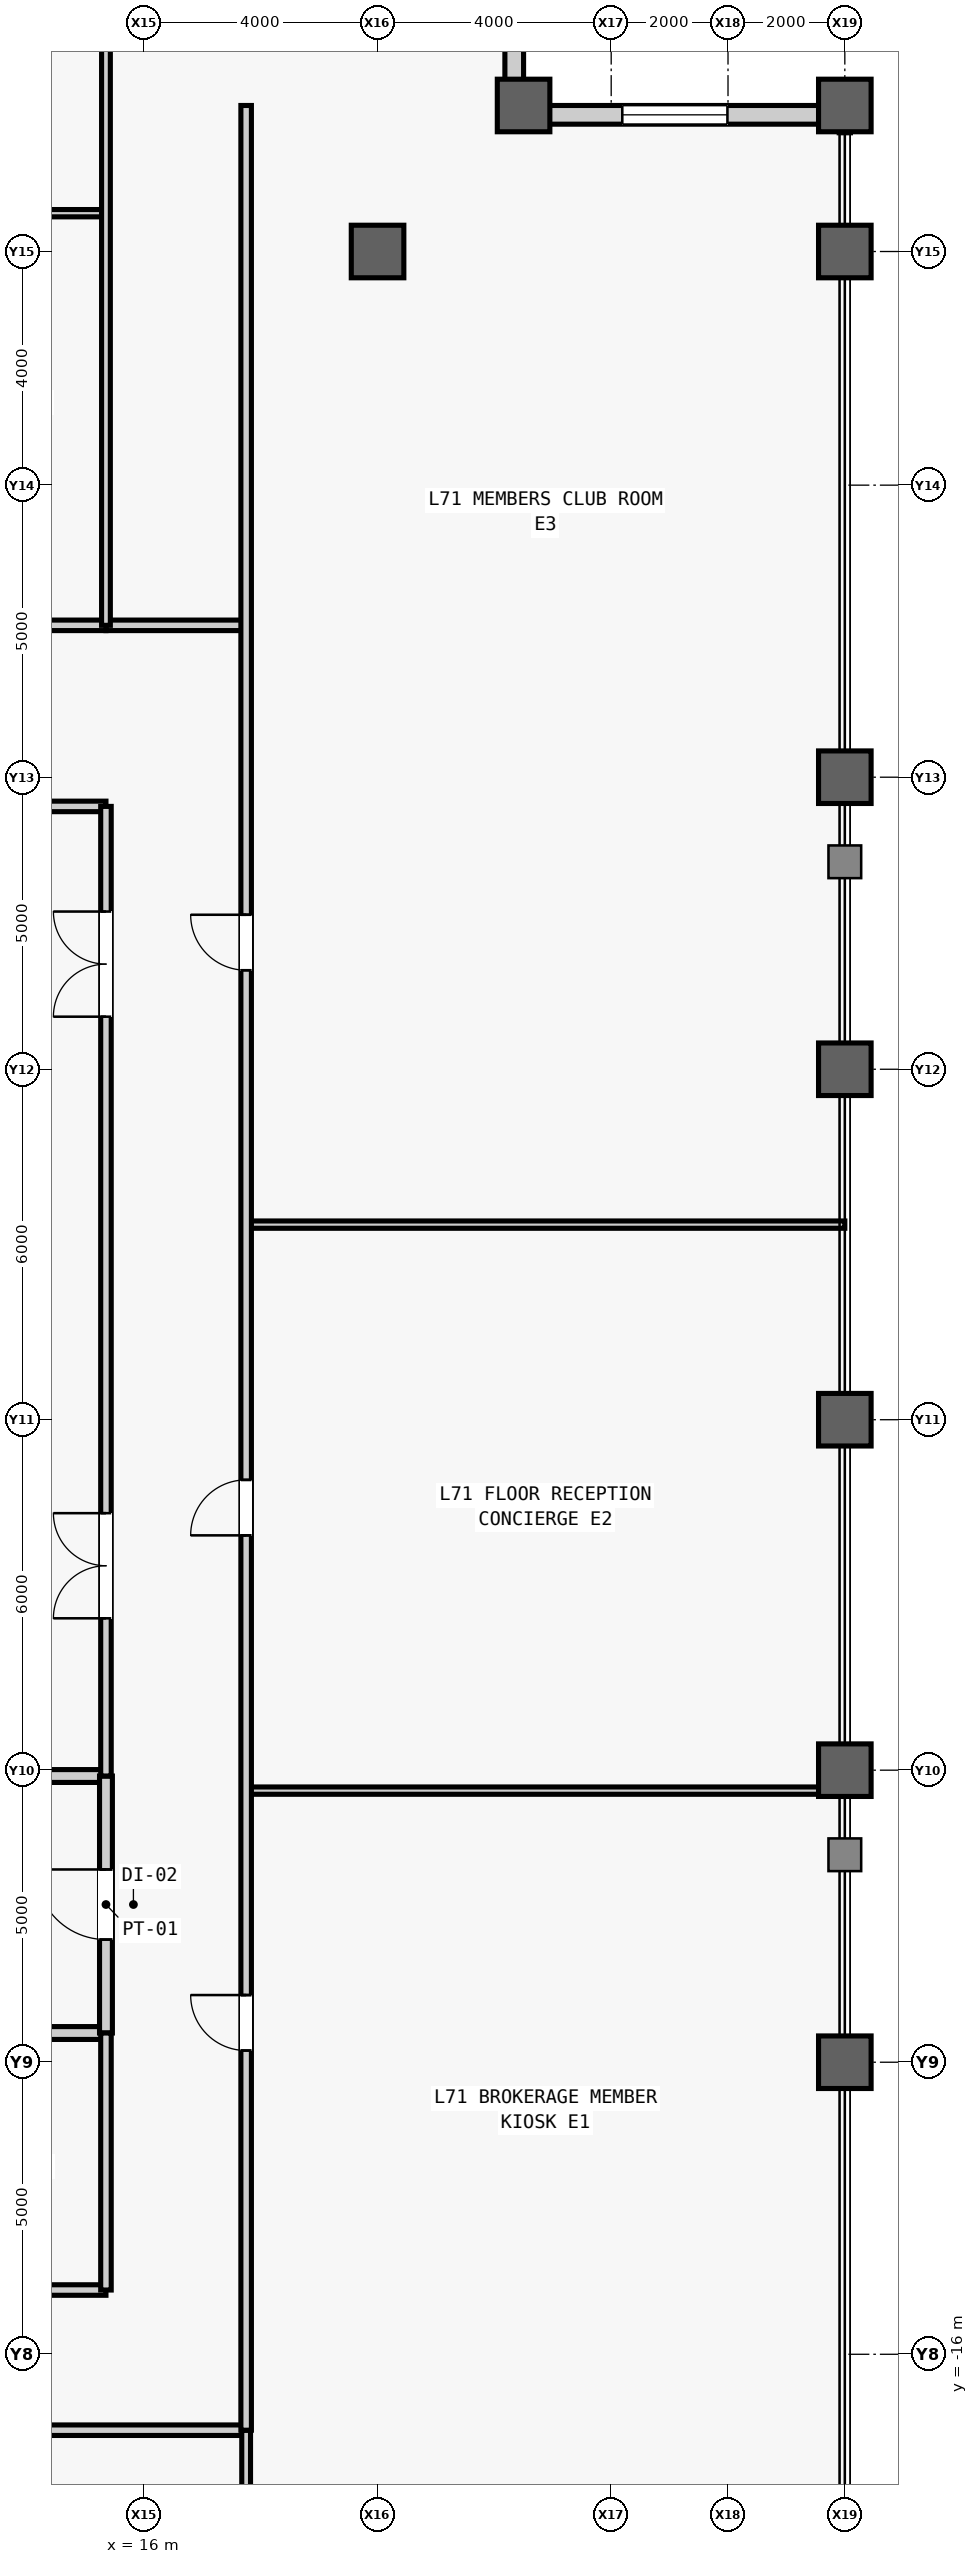
"""IFC4 building model, lengths in metres.
Left out: names, types, materials, properties, quantities, classifications, styles, units other than length and angle.
Written with IfcOpenShell. Run it as: python <this file> out.ifc"""

import sys

from ifc_helpers import new_model, si_unit, direction, frame, frame_2d, origin, origin_2d, place, context, subcontext, project, spatial, rectangle, hollow_rectangle, extrude, source, transform, mapped, element, fill, save


model = new_model("IFC4")
c1 = context("Model", 3, precision=1e-05, world=origin(), true_north=direction((0.0, 1.0)))
c2 = subcontext(c1, "Body", "Model", "MODEL_VIEW")
j1 = project(units=[si_unit("LENGTHUNIT", "METRE"), si_unit("PLANEANGLEUNIT", "RADIAN")], contexts=[c1])
p1 = place(None, origin())
s1 = spatial("IfcSite", under=j1, at=p1, CompositionType="ELEMENT")
p2 = place(p1, origin())
s2 = spatial("IfcBuilding", under=s1, at=p2, CompositionType="ELEMENT")
p3 = place(p2, frame((0.0, 0.0, 301.5)))
s3 = spatial("IfcBuildingStorey", under=s2, at=p3, CompositionType="ELEMENT", Elevation=301.5)
m1 = source(origin(), c2, "Body", "SweptSolid", [
    extrude(hollow_rectangle(XDim=0.9, YDim=0.9, WallThickness=0.05, at=origin_2d()), origin(), (0.0, 0.0, 1.0), 4.0),
])
for number, where, z_axis, x_axis in (
    (1, (20.0, 20.0, 0.0), (0.0, 0.0, 1.0), (1.0, 0.0, 0.0)),
    (2, (22.5, 22.5, 0.0), (0.0, 0.0, 1.0), (1.0, 0.0, 0.0)),
    (3, (28.0, -11.0, 0.0), (0.0, 0.0, 1.0), (1.0, 0.0, 0.0)),
    (4, (28.0, -6.0, 0.0), (0.0, 0.0, 1.0), (1.0, 0.0, 0.0)),
    (5, (28.0, 0.0, 0.0), (0.0, 0.0, 1.0), (1.0, 0.0, 0.0)),
    (6, (28.0, 6.0, 0.0), (0.0, 0.0, 1.0), (1.0, 0.0, 0.0)),
    (7, (28.0, 11.0, 0.0), (0.0, 0.0, 1.0), (1.0, 0.0, 0.0)),
    (8, (28.0, 20.0, 0.0), (0.0, 0.0, 1.0), (1.0, 0.0, 0.0)),
    (9, (28.0, 22.5, 0.0), (0.0, 0.0, 1.0), (1.0, 0.0, 0.0)),
):
    element("IfcColumn", number, at=place(p3, frame(where, z_axis=z_axis, x_axis=x_axis)), inside=s3, PredefinedType="COLUMN", context=c2, shape_type="MappedRepresentation", body=[
        mapped(m1, transform((0.0, 0.0, 0.0), scale=1.0)),
    ])
m2 = source(origin(), c2, "Body", "SweptSolid", [
    extrude(rectangle(XDim=5.18, YDim=0.32, at=frame_2d((2.59, 0.0))), origin(), (0.0, 0.0, 1.0), 3.231),
])
p4 = place(p3, frame((22.5, 22.34, 0.0), z_axis=(0.0, 0.0, 1.0), x_axis=(1.0, 0.0, 0.0)))
e10 = element("IfcWall", 10, at=p4, inside=s3, PredefinedType="STANDARD", context=c2, shape_type="MappedRepresentation", body=[
    mapped(m2, transform((0.0, 0.0, 0.0), scale=1.0)),
])
m3 = source(origin(), c2, "Body", "SweptSolid", [
    extrude(rectangle(XDim=1.8, YDim=2.4, at=frame_2d((0.9, 1.2))), frame((0.0, 0.17, 0.0), z_axis=(0.0, -1.0, 0.0), x_axis=(1.0, 0.0, 0.0)), (0.0, 0.0, 1.0), 0.34),
])
p5 = place(p4, frame((1.69, 0.0, 0.5)))
e11 = element("IfcOpeningElement", 11, at=p5, cuts=e10, PredefinedType="OPENING", context=c2, shape_type="MappedRepresentation", body=[
    mapped(m3, transform((0.0, 0.0, 0.0), scale=1.0)),
])
p6 = place(p3, frame((22.34, 22.5, 0.0), z_axis=(0.0, 0.0, 1.0), x_axis=(0.0, 1.0, 0.0)))
e12 = element("IfcWall", 12, at=p6, inside=s3, PredefinedType="STANDARD", context=c2, shape_type="MappedRepresentation", body=[
    mapped(m2, transform((0.0, 0.0, 0.0), scale=1.0)),
])
p7 = place(p6, frame((1.69, 0.0, 0.5)))
e13 = element("IfcOpeningElement", 13, at=p7, cuts=e12, PredefinedType="OPENING", context=c2, shape_type="MappedRepresentation", body=[
    mapped(m3, transform((0.0, 0.0, 0.0), scale=1.0)),
])
m4 = source(origin(), c2, "Body", "SweptSolid", [
    extrude(rectangle(XDim=4.05, YDim=0.22, at=frame_2d((2.025, 0.0))), origin(), (0.0, 0.0, 1.0), 3.78),
])
p8 = place(p3, frame((11.3, -10.5, 0.0), z_axis=(0.0, 0.0, 1.0), x_axis=(1.0, 0.0, 0.0)))
e14 = element("IfcWall", 14, at=p8, inside=s3, PredefinedType="PARTITIONING", context=c2, shape_type="MappedRepresentation", body=[
    mapped(m4, transform((0.0, 0.0, 0.0), scale=1.0)),
])
m5 = source(origin(), c2, "Body", "SweptSolid", [
    extrude(rectangle(XDim=4.05, YDim=0.22, at=frame_2d((2.025, 0.0))), origin(), (0.0, 0.0, 1.0), 3.085),
])
p9 = place(p3, frame((11.3, -6.1, 0.0), z_axis=(0.0, 0.0, 1.0), x_axis=(1.0, 0.0, 0.0)))
e15 = element("IfcWall", 15, at=p9, inside=s3, PredefinedType="PARTITIONING", context=c2, shape_type="MappedRepresentation", body=[
    mapped(m5, transform((0.0, 0.0, 0.0), scale=1.0)),
])
m6 = source(origin(), c2, "Body", "SweptSolid", [
    extrude(rectangle(XDim=4.4, YDim=0.22, at=frame_2d((2.2, 0.0))), origin(), (0.0, 0.0, 1.0), 3.78),
])
p10 = place(p3, frame((15.35, -10.5, 0.0), z_axis=(0.0, 0.0, 1.0), x_axis=(0.0, 1.0, 0.0)))
e16 = element("IfcWall", 16, at=p10, inside=s3, PredefinedType="PARTITIONING", context=c2, shape_type="MappedRepresentation", body=[
    mapped(m6, transform((0.0, 0.0, 0.0), scale=1.0)),
])
m7 = source(origin(), c2, "Body", "SweptSolid", [
    extrude(rectangle(XDim=1.2, YDim=2.2, at=frame_2d((0.6, 1.1))), frame((0.0, 0.12, 0.0), z_axis=(0.0, -1.0, 0.0), x_axis=(1.0, 0.0, 0.0)), (0.0, 0.0, 1.0), 0.24),
])
p11 = place(p10, frame((1.6, 0.0, 0.0)))
e17 = element("IfcOpeningElement", 17, at=p11, cuts=e16, PredefinedType="OPENING", context=c2, shape_type="MappedRepresentation", body=[
    mapped(m7, transform((0.0, 0.0, 0.0), scale=1.0)),
])
m8 = source(origin(), c2, "Body", "SweptSolid", [
    extrude(rectangle(XDim=4.05, YDim=0.18, at=frame_2d((2.025, 0.0))), origin(), (0.0, 0.0, 1.0), 3.78),
])
p12 = place(p3, frame((11.3, 10.5, 0.0), z_axis=(0.0, 0.0, 1.0), x_axis=(1.0, 0.0, 0.0)))
e18 = element("IfcWall", 18, at=p12, inside=s3, PredefinedType="PARTITIONING", context=c2, shape_type="MappedRepresentation", body=[
    mapped(m8, transform((0.0, 0.0, 0.0), scale=1.0)),
])
m9 = source(origin(), c2, "Body", "SweptSolid", [
    extrude(rectangle(XDim=16.6, YDim=0.18, at=frame_2d((8.3, 0.0))), origin(), (0.0, 0.0, 1.0), 3.78),
])
p13 = place(p3, frame((15.35, -6.1, 0.0), z_axis=(0.0, 0.0, 1.0), x_axis=(0.0, 1.0, 0.0)))
e19 = element("IfcWall", 19, at=p13, inside=s3, PredefinedType="PARTITIONING", context=c2, shape_type="MappedRepresentation", body=[
    mapped(m9, transform((0.0, 0.0, 0.0), scale=1.0)),
])
m10 = source(origin(), c2, "Body", "SweptSolid", [
    extrude(rectangle(XDim=1.8, YDim=2.25, at=frame_2d((0.9, 1.125))), frame((0.0, 0.1, 0.0), z_axis=(0.0, -1.0, 0.0), x_axis=(1.0, 0.0, 0.0)), (0.0, 0.0, 1.0), 0.2),
])
p14 = place(p13, frame((2.7, 0.0, 0.0)))
e20 = element("IfcOpeningElement", 20, at=p14, cuts=e19, PredefinedType="OPENING", context=c2, shape_type="MappedRepresentation", body=[
    mapped(m10, transform((0.0, 0.0, 0.0), scale=1.0)),
])
p15 = place(p13, frame((13.0, 0.0, 0.0)))
e21 = element("IfcOpeningElement", 21, at=p15, cuts=e19, PredefinedType="OPENING", context=c2, shape_type="MappedRepresentation", body=[
    mapped(m10, transform((0.0, 0.0, 0.0), scale=1.0)),
])
m11 = source(origin(), c2, "Body", "SweptSolid", [
    extrude(rectangle(XDim=14.05, YDim=0.18, at=frame_2d((7.025, 0.0))), origin(), (0.0, 0.0, 1.0), 3.78),
])
p16 = place(p3, frame((1.3, -14.9, 0.0), z_axis=(0.0, 0.0, 1.0), x_axis=(1.0, 0.0, 0.0)))
e22 = element("IfcWall", 22, at=p16, inside=s3, PredefinedType="PARTITIONING", context=c2, shape_type="MappedRepresentation", body=[
    mapped(m11, transform((0.0, 0.0, 0.0), scale=1.0)),
])
m12 = source(origin(), c2, "Body", "SweptSolid", [
    extrude(rectangle(XDim=0.9, YDim=2.15, at=frame_2d((0.45, 1.075))), frame((0.0, 0.1, 0.0), z_axis=(0.0, -1.0, 0.0), x_axis=(1.0, 0.0, 0.0)), (0.0, 0.0, 1.0), 0.2),
])
p17 = place(p16, frame((6.25, 0.0, 0.0)))
e23 = element("IfcOpeningElement", 23, at=p17, cuts=e22, PredefinedType="OPENING", context=c2, shape_type="MappedRepresentation", body=[
    mapped(m12, transform((0.0, 0.0, 0.0), scale=1.0)),
])
m13 = source(origin(), c2, "Body", "SweptSolid", [
    extrude(rectangle(XDim=4.4, YDim=0.18, at=frame_2d((2.2, 0.0))), origin(), (0.0, 0.0, 1.0), 3.78),
])
p18 = place(p3, frame((15.35, -14.9, 0.0), z_axis=(0.0, 0.0, 1.0), x_axis=(0.0, 1.0, 0.0)))
e24 = element("IfcWall", 24, at=p18, inside=s3, PredefinedType="PARTITIONING", context=c2, shape_type="MappedRepresentation", body=[
    mapped(m13, transform((0.0, 0.0, 0.0), scale=1.0)),
])
m14 = source(origin(), c2, "Body", "SweptSolid", [
    extrude(rectangle(XDim=2.4, YDim=0.18, at=frame_2d((1.2, 0.0))), origin(), (0.0, 0.0, 1.0), 3.78),
])
p19 = place(p3, frame((15.35, 13.6, 0.0), z_axis=(0.0, 0.0, 1.0), x_axis=(1.0, 0.0, 0.0)))
e25 = element("IfcWall", 25, at=p19, inside=s3, PredefinedType="PARTITIONING", context=c2, shape_type="MappedRepresentation", body=[
    mapped(m14, transform((0.0, 0.0, 0.0), scale=1.0)),
])
m15 = source(origin(), c2, "Body", "SweptSolid", [
    extrude(rectangle(XDim=37.55, YDim=0.18, at=frame_2d((18.775, 0.0))), origin(), (0.0, 0.0, 1.0), 3.78),
])
p20 = place(p3, frame((-19.8, -17.3, 0.0), z_axis=(0.0, 0.0, 1.0), x_axis=(1.0, 0.0, 0.0)))
e26 = element("IfcWall", 26, at=p20, inside=s3, PredefinedType="PARTITIONING", context=c2, shape_type="MappedRepresentation", body=[
    mapped(m15, transform((0.0, 0.0, 0.0), scale=1.0)),
])
m16 = source(origin(), c2, "Body", "SweptSolid", [
    extrude(rectangle(XDim=1.05, YDim=2.2, at=frame_2d((0.525, 1.1))), frame((0.0, 0.1, 0.0), z_axis=(0.0, -1.0, 0.0), x_axis=(1.0, 0.0, 0.0)), (0.0, 0.0, 1.0), 0.2),
])
p21 = place(p20, frame((8.424, 0.0, 0.0)))
e27 = element("IfcOpeningElement", 27, at=p21, cuts=e26, PredefinedType="OPENING", context=c2, shape_type="MappedRepresentation", body=[
    mapped(m16, transform((0.0, 0.0, 0.0), scale=1.0)),
])
p22 = place(p20, frame((26.174, 0.0, 0.0)))
e28 = element("IfcOpeningElement", 28, at=p22, cuts=e26, PredefinedType="OPENING", context=c2, shape_type="MappedRepresentation", body=[
    mapped(m16, transform((0.0, 0.0, 0.0), scale=1.0)),
])
m17 = source(origin(), c2, "Body", "SweptSolid", [
    extrude(rectangle(XDim=10.7, YDim=0.15, at=frame_2d((5.35, 0.0))), origin(), (0.0, 0.0, 1.0), 3.78),
])
p23 = place(p3, frame((17.75, -28.0, 0.0), z_axis=(0.0, 0.0, 1.0), x_axis=(0.0, 1.0, 0.0)))
e29 = element("IfcWall", 29, at=p23, inside=s3, PredefinedType="PARTITIONING", context=c2, shape_type="MappedRepresentation", body=[
    mapped(m17, transform((0.0, 0.0, 0.0), scale=1.0)),
])
m18 = source(origin(), c2, "Body", "SweptSolid", [
    extrude(rectangle(XDim=5.895, YDim=0.125, at=frame_2d((2.948, 0.0))), origin(), (0.0, 0.0, 1.0), 3.78),
])
p24 = place(p3, frame((9.455, 20.656, 0.0), z_axis=(0.0, 0.0, 1.0), x_axis=(1.0, 0.0, 0.0)))
e30 = element("IfcWall", 30, at=p24, inside=s3, PredefinedType="PARTITIONING", context=c2, shape_type="MappedRepresentation", body=[
    mapped(m18, transform((0.0, 0.0, 0.0), scale=1.0)),
])
m19 = source(origin(), c2, "Body", "SweptSolid", [
    extrude(rectangle(XDim=0.95, YDim=2.15, at=frame_2d((0.475, 1.075))), frame((0.0, 0.073, 0.0), z_axis=(0.0, -1.0, 0.0), x_axis=(1.0, 0.0, 0.0)), (0.0, 0.0, 1.0), 0.145),
])
p25 = place(p24, frame((2.472, 0.0, 0.0)))
e31 = element("IfcOpeningElement", 31, at=p25, cuts=e30, PredefinedType="OPENING", context=c2, shape_type="MappedRepresentation", body=[
    mapped(m19, transform((0.0, 0.0, 0.0), scale=1.0)),
])
m20 = source(origin(), c2, "Body", "SweptSolid", [
    extrude(rectangle(XDim=32.75, YDim=0.18, at=frame_2d((16.375, 0.0))), origin(), (0.0, 0.0, 1.0), 3.78),
])
p26 = place(p3, frame((-17.4, 13.6, 0.0), z_axis=(0.0, 0.0, 1.0), x_axis=(1.0, 0.0, 0.0)))
e32 = element("IfcWall", 32, at=p26, inside=s3, PredefinedType="PARTITIONING", context=c2, shape_type="MappedRepresentation", body=[
    mapped(m20, transform((0.0, 0.0, 0.0), scale=1.0)),
])
p27 = place(p26, frame((24.603, 0.0, 0.0)))
e33 = element("IfcOpeningElement", 33, at=p27, cuts=e32, PredefinedType="OPENING", context=c2, shape_type="MappedRepresentation", body=[
    mapped(m16, transform((0.0, 0.0, 0.0), scale=1.0)),
])
p28 = place(p26, frame((28.802, 0.0, 0.0)))
e34 = element("IfcOpeningElement", 34, at=p28, cuts=e32, PredefinedType="OPENING", context=c2, shape_type="MappedRepresentation", body=[
    mapped(m16, transform((0.0, 0.0, 0.0), scale=1.0)),
])
m21 = source(origin(), c2, "Body", "SweptSolid", [
    extrude(rectangle(XDim=14.4, YDim=0.15, at=frame_2d((7.2, 0.0))), origin(), (0.0, 0.0, 1.0), 3.78),
])
p29 = place(p3, frame((15.35, 13.6, 0.0), z_axis=(0.0, 0.0, 1.0), x_axis=(0.0, 1.0, 0.0)))
e35 = element("IfcWall", 35, at=p29, inside=s3, PredefinedType="PARTITIONING", context=c2, shape_type="MappedRepresentation", body=[
    mapped(m21, transform((0.0, 0.0, 0.0), scale=1.0)),
])
m22 = source(origin(), c2, "Body", "SweptSolid", [
    extrude(rectangle(XDim=10.25, YDim=0.125, at=frame_2d((5.125, 0.0))), origin(), (0.0, 0.0, 1.0), 3.78),
])
for number, where, z_axis, x_axis in (
    (36, (17.75, -6.35, 0.0), (0.0, 0.0, 1.0), (1.0, 0.0, 0.0)),
    (37, (17.75, 3.34, 0.0), (0.0, 0.0, 1.0), (1.0, 0.0, 0.0)),
):
    element("IfcWall", number, at=place(p3, frame(where, z_axis=z_axis, x_axis=x_axis)), inside=s3, PredefinedType="PARTITIONING", context=c2, shape_type="MappedRepresentation", body=[
        mapped(m22, transform((0.0, 0.0, 0.0), scale=1.0)),
    ])
m23 = source(origin(), c2, "Body", "SweptSolid", [
    extrude(rectangle(XDim=39.8, YDim=0.18, at=frame_2d((19.9, 0.0))), origin(), (0.0, 0.0, 1.0), 3.78),
])
p30 = place(p3, frame((17.75, -17.3, 0.0), z_axis=(0.0, 0.0, 1.0), x_axis=(0.0, 1.0, 0.0)))
e38 = element("IfcWall", 38, at=p30, inside=s3, PredefinedType="PARTITIONING", context=c2, shape_type="MappedRepresentation", body=[
    mapped(m23, transform((0.0, 0.0, 0.0), scale=1.0)),
])
m24 = source(origin(), c2, "Body", "SweptSolid", [
    extrude(rectangle(XDim=0.95, YDim=2.15, at=frame_2d((0.475, 1.075))), frame((0.0, 0.1, 0.0), z_axis=(0.0, -1.0, 0.0), x_axis=(1.0, 0.0, 0.0)), (0.0, 0.0, 1.0), 0.2),
])
p31 = place(p30, frame((6.5, 0.0, 0.0)))
e39 = element("IfcOpeningElement", 39, at=p31, cuts=e38, PredefinedType="OPENING", context=c2, shape_type="MappedRepresentation", body=[
    mapped(m24, transform((0.0, 0.0, 0.0), scale=1.0)),
])
p32 = place(p30, frame((15.32, 0.0, 0.0)))
e40 = element("IfcOpeningElement", 40, at=p32, cuts=e38, PredefinedType="OPENING", context=c2, shape_type="MappedRepresentation", body=[
    mapped(m24, transform((0.0, 0.0, 0.0), scale=1.0)),
])
p33 = place(p30, frame((24.995, 0.0, 0.0)))
e41 = element("IfcOpeningElement", 41, at=p33, cuts=e38, PredefinedType="OPENING", context=c2, shape_type="MappedRepresentation", body=[
    mapped(m24, transform((0.0, 0.0, 0.0), scale=1.0)),
])
m25 = source(origin(), c2, "Body", "SweptSolid", [
    extrude(rectangle(XDim=1.8, YDim=2.4, at=frame_2d((0.9, 1.2))), frame((0.0, 0.03, 0.0), z_axis=(0.0, -1.0, 0.0), x_axis=(1.0, 0.0, 0.0)), (0.0, 0.0, 1.0), 0.06),
])
p34 = place(p5, origin())
e42 = element("IfcWindow", 42, at=p34, inside=s3, PartitioningType="SINGLE_PANEL", PredefinedType="WINDOW", context=c2, shape_type="MappedRepresentation", body=[
    mapped(m25, transform((0.0, 0.0, 0.0), scale=1.0)),
])
fill(e11, e42)
m26 = source(origin(), c2, "Body", "SweptSolid", [
    extrude(rectangle(XDim=1.2, YDim=2.2, at=frame_2d((0.6, 1.1))), frame((0.0, 0.025, 0.0), z_axis=(0.0, -1.0, 0.0), x_axis=(1.0, 0.0, 0.0)), (0.0, 0.0, 1.0), 0.05),
])
p35 = place(p11, origin())
e43 = element("IfcDoor", 43, at=p35, inside=s3, OperationType="SINGLE_SWING_RIGHT", PredefinedType="DOOR", context=c2, shape_type="MappedRepresentation", body=[
    mapped(m26, transform((0.0, 0.0, 0.0), scale=1.0)),
])
fill(e17, e43)
m27 = source(origin(), c2, "Body", "SweptSolid", [
    extrude(rectangle(XDim=1.8, YDim=2.25, at=frame_2d((0.9, 1.125))), frame((0.0, 0.025, 0.0), z_axis=(0.0, -1.0, 0.0), x_axis=(1.0, 0.0, 0.0)), (0.0, 0.0, 1.0), 0.05),
])
p36 = place(p14, origin())
e44 = element("IfcDoor", 44, at=p36, inside=s3, OperationType="SINGLE_SWING_RIGHT", PredefinedType="DOOR", context=c2, shape_type="MappedRepresentation", body=[
    mapped(m27, transform((0.0, 0.0, 0.0), scale=1.0)),
])
fill(e20, e44)
p37 = place(p15, origin())
e45 = element("IfcDoor", 45, at=p37, inside=s3, OperationType="SINGLE_SWING_LEFT", PredefinedType="DOOR", context=c2, shape_type="MappedRepresentation", body=[
    mapped(m27, transform((0.0, 0.0, 0.0), scale=1.0)),
])
fill(e21, e45)
m28 = source(origin(), c2, "Body", "SweptSolid", [
    extrude(rectangle(XDim=0.95, YDim=2.15, at=frame_2d((0.475, 1.075))), frame((0.0, 0.025, 0.0), z_axis=(0.0, -1.0, 0.0), x_axis=(1.0, 0.0, 0.0)), (0.0, 0.0, 1.0), 0.05),
])
p38 = place(p31, origin())
e46 = element("IfcDoor", 46, at=p38, inside=s3, OperationType="SINGLE_SWING_RIGHT", PredefinedType="DOOR", context=c2, shape_type="MappedRepresentation", body=[
    mapped(m28, transform((0.0, 0.0, 0.0), scale=1.0)),
])
fill(e39, e46)
p39 = place(p32, origin())
e47 = element("IfcDoor", 47, at=p39, inside=s3, OperationType="SINGLE_SWING_LEFT", PredefinedType="DOOR", context=c2, shape_type="MappedRepresentation", body=[
    mapped(m28, transform((0.0, 0.0, 0.0), scale=1.0)),
])
fill(e40, e47)
p40 = place(p33, origin())
e48 = element("IfcDoor", 48, at=p40, inside=s3, OperationType="SINGLE_SWING_RIGHT", PredefinedType="DOOR", context=c2, shape_type="MappedRepresentation", body=[
    mapped(m28, transform((0.0, 0.0, 0.0), scale=1.0)),
])
fill(e41, e48)
save(model, sys.argv[1])
